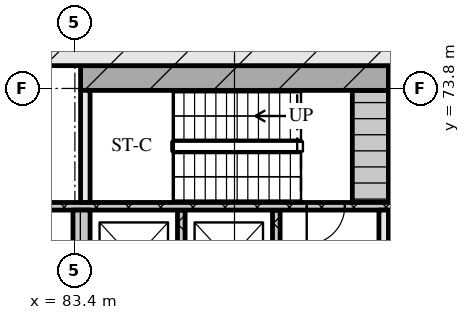
"""IFC4 building model, lengths in metres.
Left out: names, types, materials, properties, quantities, classifications, styles, units other than length and angle.
Written with IfcOpenShell. Run it as: python <this file> out.ifc"""

import sys

from ifc_helpers import new_model, si_unit, direction, frame, frame_2d, origin, place, context, subcontext, project, spatial, rectangle, extrude, element, fill, save


model = new_model("IFC4")
c1 = context("Model", 3, precision=1e-05, world=origin(), true_north=direction((0.0, 1.0)))
c2 = subcontext(c1, "Body", "Model", "MODEL_VIEW")
j1 = project(units=[si_unit("LENGTHUNIT", "METRE"), si_unit("PLANEANGLEUNIT", "RADIAN")], contexts=[c1])
p1 = place(None, origin())
s1 = spatial("IfcSite", under=j1, at=p1, CompositionType="ELEMENT")
p2 = place(p1, origin())
s2 = spatial("IfcBuilding", under=s1, at=p2, CompositionType="ELEMENT")
p3 = place(p2, frame((0.0, 0.0, 14.4)))
s3 = spatial("IfcBuildingStorey", under=s2, at=p3, CompositionType="ELEMENT", Elevation=14.4)
p4 = place(p3, frame((66.6, 75.0, 0.0), z_axis=(0.0, 0.0, 1.0), x_axis=(1.0, 0.0, 0.0)))
e1 = element("IfcWall", 1, at=p4, inside=s3, PredefinedType="SOLIDWALL", context=c2, shape_type="SweptSolid", body=[
    extrude(rectangle(XDim=42.0, YDim=1.2, at=frame_2d((21.0, 0.0))), origin(), (0.0, 0.0, 1.0), 4.5),
])
p5 = place(p3, frame((83.575, 68.0, 0.0), z_axis=(0.0, 0.0, 1.0), x_axis=(0.0, 1.0, 0.0)))
e2 = element("IfcWall", 2, at=p5, inside=s3, PredefinedType="SOLIDWALL", context=c2, shape_type="SweptSolid", body=[
    extrude(rectangle(XDim=2.6, YDim=0.45, at=frame_2d((1.3, 0.0))), origin(), (0.0, 0.0, 1.0), 4.5),
])
for number, where, z_axis, x_axis in (
    (3, (86.2, 68.0, 0.0), (0.0, 0.0, 1.0), (0.0, 1.0, 0.0)),
    (4, (88.7, 68.0, 0.0), (0.0, 0.0, 1.0), (0.0, 1.0, 0.0)),
):
    element("IfcWall", number, at=place(p3, frame(where, z_axis=z_axis, x_axis=x_axis)), inside=s3, PredefinedType="SOLIDWALL", context=c2, shape_type="SweptSolid", body=[
        extrude(rectangle(XDim=2.6, YDim=0.2, at=frame_2d((1.3, 0.0))), origin(), (0.0, 0.0, 1.0), 4.5),
    ])
p6 = place(p3, frame((91.525, 68.0, 0.0), z_axis=(0.0, 0.0, 1.0), x_axis=(0.0, 1.0, 0.0)))
e5 = element("IfcWall", 5, at=p6, inside=s3, PredefinedType="SOLIDWALL", context=c2, shape_type="SweptSolid", body=[
    extrude(rectangle(XDim=2.6, YDim=0.25, at=frame_2d((1.3, 0.0))), origin(), (0.0, 0.0, 1.0), 4.5),
])
p7 = place(p3, frame((67.8, 70.7, 0.0), z_axis=(0.0, 0.0, 1.0), x_axis=(1.0, 0.0, 0.0)))
e6 = element("IfcWall", 6, at=p7, inside=s3, PredefinedType="SOLIDWALL", context=c2, shape_type="SweptSolid", body=[
    extrude(rectangle(XDim=39.6, YDim=0.2, at=frame_2d((19.8, 0.0))), origin(), (0.0, 0.0, 1.0), 4.5),
])
p8 = place(p7, frame((0.65, 0.0, 0.0)))
e7 = element("IfcOpeningElement", 7, at=p8, cuts=e6, PredefinedType="OPENING", context=c2, shape_type="SweptSolid", body=[
    extrude(rectangle(XDim=1.1, YDim=2.1, at=frame_2d((0.55, 1.05))), frame((0.0, 0.11, 0.0), z_axis=(0.0, -1.0, 0.0), x_axis=(1.0, 0.0, 0.0)), (0.0, 0.0, 1.0), 0.22),
])
p9 = place(p7, frame((3.25, 0.0, 0.0)))
e8 = element("IfcOpeningElement", 8, at=p9, cuts=e6, PredefinedType="OPENING", context=c2, shape_type="SweptSolid", body=[
    extrude(rectangle(XDim=1.1, YDim=2.1, at=frame_2d((0.55, 1.05))), frame((0.0, 0.11, 0.0), z_axis=(0.0, -1.0, 0.0), x_axis=(1.0, 0.0, 0.0)), (0.0, 0.0, 1.0), 0.22),
])
p10 = place(p7, frame((5.9, 0.0, 0.0)))
e9 = element("IfcOpeningElement", 9, at=p10, cuts=e6, PredefinedType="OPENING", context=c2, shape_type="SweptSolid", body=[
    extrude(rectangle(XDim=1.0, YDim=2.1, at=frame_2d((0.5, 1.05))), frame((0.0, 0.11, 0.0), z_axis=(0.0, -1.0, 0.0), x_axis=(1.0, 0.0, 0.0)), (0.0, 0.0, 1.0), 0.22),
])
p11 = place(p7, frame((21.7, 0.0, 0.0)))
e10 = element("IfcOpeningElement", 10, at=p11, cuts=e6, PredefinedType="OPENING", context=c2, shape_type="SweptSolid", body=[
    extrude(rectangle(XDim=1.0, YDim=2.1, at=frame_2d((0.5, 1.05))), frame((0.0, 0.11, 0.0), z_axis=(0.0, -1.0, 0.0), x_axis=(1.0, 0.0, 0.0)), (0.0, 0.0, 1.0), 0.22),
])
p12 = place(p7, frame((32.7, 0.0, 0.0)))
e11 = element("IfcOpeningElement", 11, at=p12, cuts=e6, PredefinedType="OPENING", context=c2, shape_type="SweptSolid", body=[
    extrude(rectangle(XDim=1.0, YDim=2.1, at=frame_2d((0.5, 1.05))), frame((0.0, 0.11, 0.0), z_axis=(0.0, -1.0, 0.0), x_axis=(1.0, 0.0, 0.0)), (0.0, 0.0, 1.0), 0.22),
])
p13 = place(p7, frame((35.25, 0.0, 0.0)))
e12 = element("IfcOpeningElement", 12, at=p13, cuts=e6, PredefinedType="OPENING", context=c2, shape_type="SweptSolid", body=[
    extrude(rectangle(XDim=1.1, YDim=2.1, at=frame_2d((0.55, 1.05))), frame((0.0, 0.11, 0.0), z_axis=(0.0, -1.0, 0.0), x_axis=(1.0, 0.0, 0.0)), (0.0, 0.0, 1.0), 0.22),
])
p14 = place(p7, frame((37.85, 0.0, 0.0)))
e13 = element("IfcOpeningElement", 13, at=p14, cuts=e6, PredefinedType="OPENING", context=c2, shape_type="SweptSolid", body=[
    extrude(rectangle(XDim=1.1, YDim=2.1, at=frame_2d((0.55, 1.05))), frame((0.0, 0.11, 0.0), z_axis=(0.0, -1.0, 0.0), x_axis=(1.0, 0.0, 0.0)), (0.0, 0.0, 1.0), 0.22),
])
p15 = place(p3, frame((83.675, 70.8, 0.0), z_axis=(0.0, 0.0, 1.0), x_axis=(0.0, 1.0, 0.0)))
e14 = element("IfcWall", 14, at=p15, inside=s3, PredefinedType="SOLIDWALL", context=c2, shape_type="SweptSolid", body=[
    extrude(rectangle(XDim=2.95, YDim=0.25, at=frame_2d((1.475, 0.0))), origin(), (0.0, 0.0, 1.0), 4.5),
])
p16 = place(p3, frame((91.175, 70.8, 0.0), z_axis=(0.0, 0.0, 1.0), x_axis=(0.0, 1.0, 0.0)))
e15 = element("IfcWall", 15, at=p16, inside=s3, PredefinedType="SOLIDWALL", context=c2, shape_type="SweptSolid", body=[
    extrude(rectangle(XDim=2.95, YDim=0.95, at=frame_2d((1.475, 0.0))), origin(), (0.0, 0.0, 1.0), 4.5),
])
p17 = place(p3, frame((83.55, 74.075, 0.0), z_axis=(0.0, 0.0, 1.0), x_axis=(1.0, 0.0, 0.0)))
e16 = element("IfcWall", 16, at=p17, inside=s3, PredefinedType="SOLIDWALL", context=c2, shape_type="SweptSolid", body=[
    extrude(rectangle(XDim=8.1, YDim=0.65, at=frame_2d((4.05, 0.0))), origin(), (0.0, 0.0, 1.0), 4.5),
])
p18 = place(p11, origin())
e17 = element("IfcDoor", 17, at=p18, inside=s3, OperationType="SINGLE_SWING_RIGHT", PredefinedType="DOOR", context=c2, shape_type="SweptSolid", body=[
    extrude(rectangle(XDim=1.0, YDim=2.1, at=frame_2d((0.5, 1.05))), frame((0.0, 0.025, 0.0), z_axis=(0.0, -1.0, 0.0), x_axis=(1.0, 0.0, 0.0)), (0.0, 0.0, 1.0), 0.05),
])
fill(e10, e17)
save(model, sys.argv[1])
